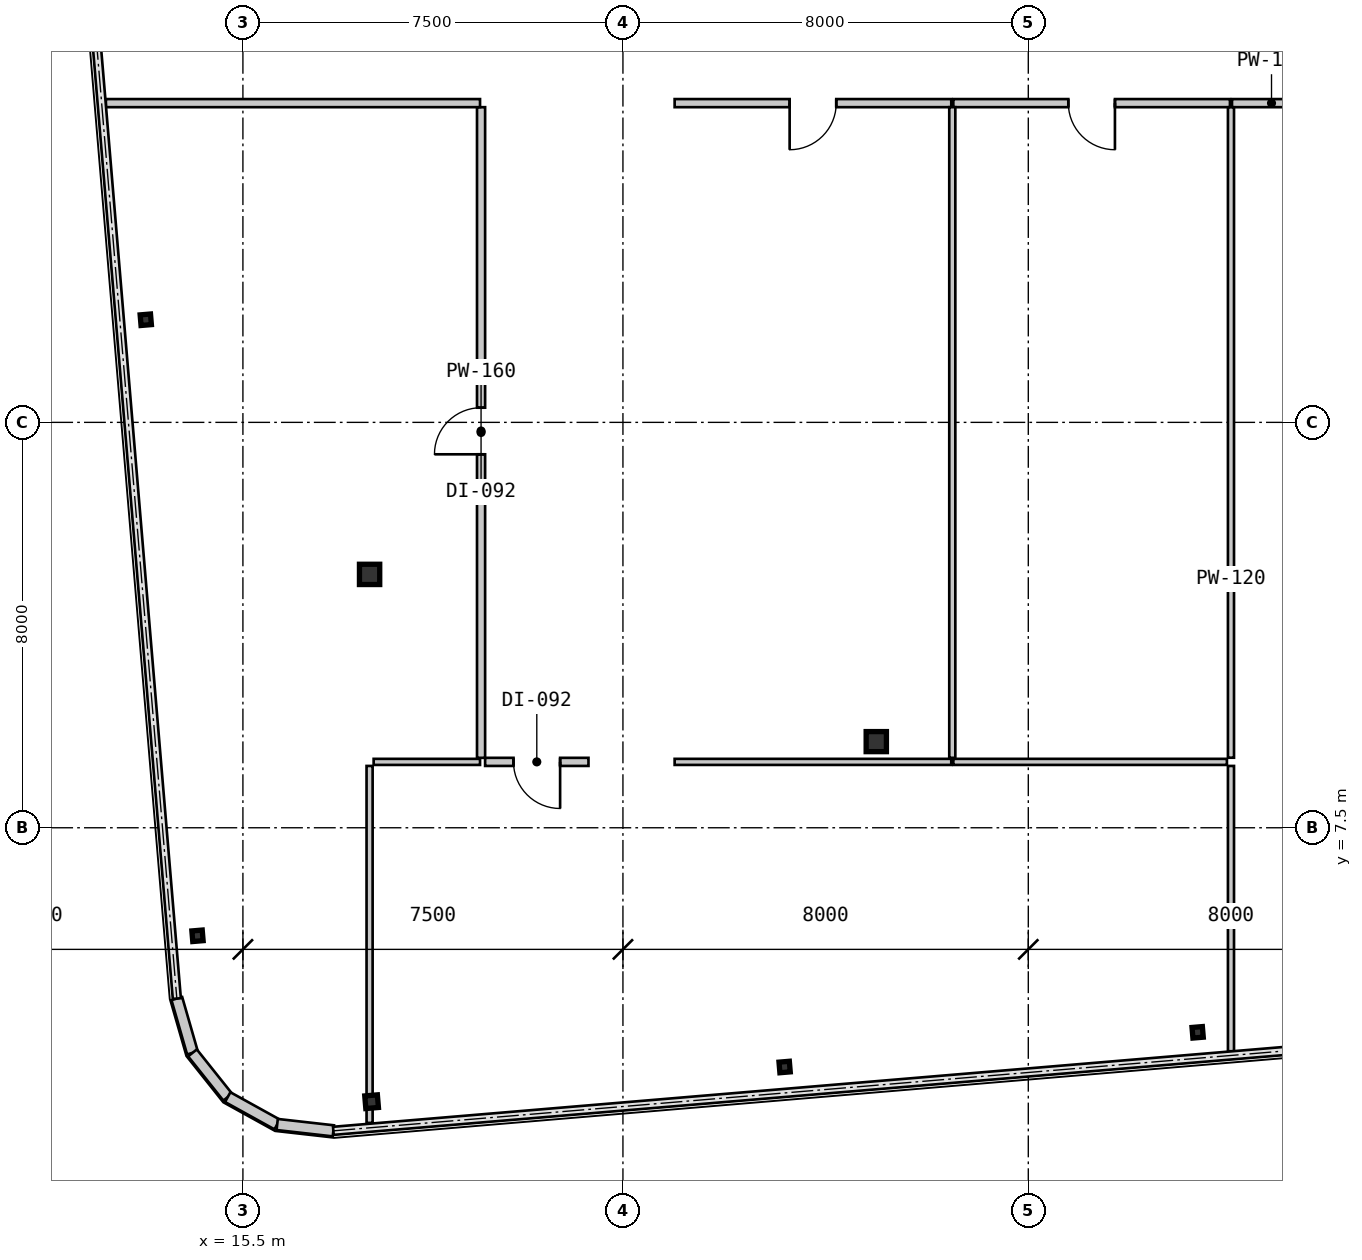
"""IFC4 building model, lengths in metres.
Left out: names, types, materials, properties, quantities, classifications, styles, units other than length and angle.
Written with IfcOpenShell. Run it as: python <this file> out.ifc"""

import sys

from ifc_helpers import new_model, si_unit, direction, frame, frame_2d, origin, origin_2d, place, context, subcontext, project, spatial, rectangle, hollow_rectangle, i_section, extrude, source, transform, mapped, element, fill, save


model = new_model("IFC4")
c1 = context("Model", 3, precision=1e-05, world=origin(), true_north=direction((0.0, 1.0)))
c2 = subcontext(c1, "Body", "Model", "MODEL_VIEW")
j1 = project(units=[si_unit("LENGTHUNIT", "METRE"), si_unit("PLANEANGLEUNIT", "RADIAN")], contexts=[c1])
p1 = place(None, origin())
s1 = spatial("IfcSite", under=j1, at=p1, CompositionType="ELEMENT")
p2 = place(p1, origin())
s2 = spatial("IfcBuilding", under=s1, at=p2, CompositionType="ELEMENT")
p3 = place(p2, frame((0.0, 0.0, 185.15)))
s3 = spatial("IfcBuildingStorey", under=s2, at=p3, CompositionType="ELEMENT", Elevation=185.15)
m1 = source(origin(), c2, "Body", "SweptSolid", [
    extrude(i_section(OverallWidth=0.4, OverallDepth=0.396, WebThickness=0.022, FlangeThickness=0.034, at=origin_2d()), origin(), (0.0, 0.0, 1.0), 3.15),
])
p4 = place(p3, frame((28.0, 9.2, 0.0), z_axis=(0.0, 0.0, 1.0), x_axis=(1.0, 0.0, 0.0)))
e1 = element("IfcColumn", 1, at=p4, inside=s3, PredefinedType="COLUMN", context=c2, shape_type="MappedRepresentation", body=[
    mapped(m1, transform((0.0, 0.0, 0.0), scale=1.0)),
])
m2 = source(origin(), c2, "Body", "SweptSolid", [
    extrude(hollow_rectangle(XDim=0.4, YDim=0.4, WallThickness=0.016, at=origin_2d()), origin(), (0.0, 0.0, 1.0), 3.15),
])
p5 = place(p3, frame((18.0, 12.5, 0.0), z_axis=(0.0, 0.0, 1.0), x_axis=(1.0, 0.0, 0.0)))
e2 = element("IfcColumn", 2, at=p5, inside=s3, PredefinedType="COLUMN", context=c2, shape_type="MappedRepresentation", body=[
    mapped(m2, transform((0.0, 0.0, 0.0), scale=1.0)),
])
m3 = source(origin(), c2, "Body", "SweptSolid", [
    extrude(hollow_rectangle(XDim=0.25, YDim=0.25, WallThickness=0.01, at=origin_2d()), origin(), (0.0, 0.0, 1.0), 3.15),
])
p6 = place(p3, frame((18.04, 2.094, 0.0), z_axis=(0.0, 0.0, 1.0), x_axis=(0.99649285925, 0.083677843332, 0.0)))
e3 = element("IfcColumn", 3, at=p6, inside=s3, PredefinedType="COLUMN", context=c2, shape_type="MappedRepresentation", body=[
    mapped(m3, transform((0.0, 0.0, 0.0), scale=1.0)),
])
m4 = source(origin(), c2, "Body", "SweptSolid", [
    extrude(i_section(OverallWidth=0.205, OverallDepth=0.21, WebThickness=0.009, FlangeThickness=0.014, at=origin_2d()), origin(), (0.0, 0.0, 1.0), 3.15),
])
for number, where, z_axis, x_axis in (
    (4, (26.191, 2.779, 0.0), (0.0, 0.0, 1.0), (0.996, 0.084, 0.0)),
    (5, (34.342, 3.463, 0.0), (0.0, 0.0, 1.0), (0.996, 0.084, 0.0)),
    (6, (14.604, 5.368, 0.0), (0.0, 0.0, 1.0), (0.996, 0.084, 0.0)),
    (7, (13.583, 17.525, 0.0), (0.0, 0.0, 1.0), (0.996, 0.084, 0.0)),
):
    element("IfcColumn", number, at=place(p3, frame(where, z_axis=z_axis, x_axis=x_axis)), inside=s3, PredefinedType="COLUMN", context=c2, shape_type="MappedRepresentation", body=[
        mapped(m4, transform((0.0, 0.0, 0.0), scale=1.0)),
    ])
m5 = source(origin(), c2, "Body", "SweptSolid", [
    extrude(rectangle(XDim=1.116, YDim=0.22, at=frame_2d((0.558, 0.0))), origin(), (0.0, 0.0, 1.0), 2.93),
])
for number, where, z_axis, x_axis in (
    (8, (14.196, 4.13, 0.0), (0.0, 0.0, 1.0), (0.277, -0.961, 0.0)),
    (9, (14.504, 3.057, 0.0), (0.0, 0.0, 1.0), (0.623, -0.782, 0.0)),
    (10, (15.2, 2.184, 0.0), (0.0, 0.0, 1.0), (0.875, -0.484, 0.0)),
    (11, (16.176, 1.644, 0.0), (0.0, 0.0, 1.0), (0.994, -0.112, 0.0)),
):
    element("IfcWall", number, at=place(p3, frame(where, z_axis=z_axis, x_axis=x_axis)), inside=s3, PredefinedType="SOLIDWALL", context=c2, shape_type="MappedRepresentation", body=[
        mapped(m5, transform((0.0, 0.0, 0.0), scale=1.0)),
    ])
m6 = source(origin(), c2, "Body", "SweptSolid", [
    extrude(rectangle(XDim=2.04, YDim=0.16, at=frame_2d((1.02, 0.0))), origin(), (0.0, 0.0, 1.0), 2.93),
])
p7 = place(p3, frame((22.32, 8.8, 0.0), z_axis=(0.0, 0.0, 1.0), x_axis=(-1.0, 0.0, 0.0)))
e12 = element("IfcWall", 12, at=p7, inside=s3, PredefinedType="PARTITIONING", context=c2, shape_type="MappedRepresentation", body=[
    mapped(m6, transform((0.0, 0.0, 0.0), scale=1.0)),
])
m7 = source(origin(), c2, "Body", "SweptSolid", [
    extrude(rectangle(XDim=0.92, YDim=2.1, at=frame_2d((0.46, 1.05))), frame((0.0, 0.09, 0.0), z_axis=(0.0, -1.0, 0.0), x_axis=(1.0, 0.0, 0.0)), (0.0, 0.0, 1.0), 0.18),
])
p8 = place(p7, frame((0.56, 0.0, 0.0)))
e13 = element("IfcOpeningElement", 13, at=p8, cuts=e12, PredefinedType="OPENING", context=c2, shape_type="MappedRepresentation", body=[
    mapped(m7, transform((0.0, 0.0, 0.0), scale=1.0)),
])
m8 = source(origin(), c2, "Body", "SweptSolid", [
    extrude(rectangle(XDim=12.84, YDim=0.16, at=frame_2d((6.42, 0.0))), origin(), (0.0, 0.0, 1.0), 2.93),
])
p9 = place(p3, frame((20.2, 8.88, 0.0), z_axis=(0.0, 0.0, 1.0), x_axis=(0.0, 1.0, 0.0)))
e14 = element("IfcWall", 14, at=p9, inside=s3, PredefinedType="PARTITIONING", context=c2, shape_type="MappedRepresentation", body=[
    mapped(m8, transform((0.0, 0.0, 0.0), scale=1.0)),
])
p10 = place(p9, frame((5.99, 0.0, 0.0)))
e15 = element("IfcOpeningElement", 15, at=p10, cuts=e14, PredefinedType="OPENING", context=c2, shape_type="MappedRepresentation", body=[
    mapped(m7, transform((0.0, 0.0, 0.0), scale=1.0)),
])
m9 = source(origin(), c2, "Body", "SweptSolid", [
    extrude(rectangle(XDim=7.384, YDim=0.16, at=frame_2d((3.692, 0.0))), origin(), (0.0, 0.0, 1.0), 2.93),
])
p11 = place(p3, frame((20.18, 21.8, 0.0), z_axis=(0.0, 0.0, 1.0), x_axis=(-1.0, 0.0, 0.0)))
e16 = element("IfcWall", 16, at=p11, inside=s3, PredefinedType="PARTITIONING", context=c2, shape_type="MappedRepresentation", body=[
    mapped(m9, transform((0.0, 0.0, 0.0), scale=1.0)),
])
m10 = source(origin(), c2, "Body", "SweptSolid", [
    extrude(rectangle(XDim=5.459, YDim=0.16, at=frame_2d((2.73, 0.0))), origin(), (0.0, 0.0, 1.0), 2.93),
])
p12 = place(p3, frame((29.48, 21.8, 0.0), z_axis=(0.0, 0.0, 1.0), x_axis=(-1.0, 0.0, 0.0)))
e17 = element("IfcWall", 17, at=p12, inside=s3, PredefinedType="PARTITIONING", context=c2, shape_type="MappedRepresentation", body=[
    mapped(m10, transform((0.0, 0.0, 0.0), scale=1.0)),
])
p13 = place(p12, frame((2.27, 0.0, 0.0)))
e18 = element("IfcOpeningElement", 18, at=p13, cuts=e17, PredefinedType="OPENING", context=c2, shape_type="MappedRepresentation", body=[
    mapped(m7, transform((0.0, 0.0, 0.0), scale=1.0)),
])
p14 = place(p3, frame((34.98, 21.8, 0.0), z_axis=(0.0, 0.0, 1.0), x_axis=(-1.0, 0.0, 0.0)))
e19 = element("IfcWall", 19, at=p14, inside=s3, PredefinedType="PARTITIONING", context=c2, shape_type="MappedRepresentation", body=[
    mapped(m10, transform((0.0, 0.0, 0.0), scale=1.0)),
])
p15 = place(p14, frame((2.27, 0.0, 0.0)))
e20 = element("IfcOpeningElement", 20, at=p15, cuts=e19, PredefinedType="OPENING", context=c2, shape_type="MappedRepresentation", body=[
    mapped(m7, transform((0.0, 0.0, 0.0), scale=1.0)),
])
m11 = source(origin(), c2, "Body", "SweptSolid", [
    extrude(rectangle(XDim=7.459, YDim=0.16, at=frame_2d((3.73, 0.0))), origin(), (0.0, 0.0, 1.0), 2.93),
])
p16 = place(p3, frame((42.48, 21.8, 0.0), z_axis=(0.0, 0.0, 1.0), x_axis=(-1.0, 0.0, 0.0)))
e21 = element("IfcWall", 21, at=p16, inside=s3, PredefinedType="PARTITIONING", context=c2, shape_type="MappedRepresentation", body=[
    mapped(m11, transform((0.0, 0.0, 0.0), scale=1.0)),
])
p17 = place(p16, frame((3.27, 0.0, 0.0)))
e22 = element("IfcOpeningElement", 22, at=p17, cuts=e21, PredefinedType="OPENING", context=c2, shape_type="MappedRepresentation", body=[
    mapped(m7, transform((0.0, 0.0, 0.0), scale=1.0)),
])
m12 = source(origin(), c2, "Body", "SweptSolid", [
    extrude(rectangle(XDim=0.418, YDim=0.12, at=frame_2d((0.209, 0.0))), origin(), (0.0, 0.0, 1.0), 2.93),
])
p18 = place(p3, frame((18.0, 1.676, 0.0), z_axis=(0.0, 0.0, 1.0), x_axis=(0.0, 1.0, 0.0)))
e23 = element("IfcWall", 23, at=p18, inside=s3, PredefinedType="PARTITIONING", context=c2, shape_type="MappedRepresentation", body=[
    mapped(m12, transform((0.0, 0.0, 0.0), scale=1.0)),
])
m13 = source(origin(), c2, "Body", "SweptSolid", [
    extrude(rectangle(XDim=6.626, YDim=0.12, at=frame_2d((3.313, 0.0))), origin(), (0.0, 0.0, 1.0), 2.47),
])
p19 = place(p3, frame((18.0, 2.094, 0.0), z_axis=(0.0, 0.0, 1.0), x_axis=(0.0, 1.0, 0.0)))
e24 = element("IfcWall", 24, at=p19, inside=s3, PredefinedType="PARTITIONING", context=c2, shape_type="MappedRepresentation", body=[
    mapped(m13, transform((0.0, 0.0, 0.0), scale=1.0)),
])
m14 = source(origin(), c2, "Body", "SweptSolid", [
    extrude(rectangle(XDim=2.1, YDim=0.12, at=frame_2d((1.05, 0.0))), origin(), (0.0, 0.0, 1.0), 2.93),
])
p20 = place(p3, frame((18.08, 8.8, 0.0), z_axis=(0.0, 0.0, 1.0), x_axis=(1.0, 0.0, 0.0)))
e25 = element("IfcWall", 25, at=p20, inside=s3, PredefinedType="PARTITIONING", context=c2, shape_type="MappedRepresentation", body=[
    mapped(m14, transform((0.0, 0.0, 0.0), scale=1.0)),
])
m15 = source(origin(), c2, "Body", "SweptSolid", [
    extrude(rectangle(XDim=5.459, YDim=0.12, at=frame_2d((2.73, 0.0))), origin(), (0.0, 0.0, 1.0), 2.93),
])
p21 = place(p3, frame((24.02, 8.8, 0.0), z_axis=(0.0, 0.0, 1.0), x_axis=(1.0, 0.0, 0.0)))
e26 = element("IfcWall", 26, at=p21, inside=s3, PredefinedType="PARTITIONING", context=c2, shape_type="MappedRepresentation", body=[
    mapped(m15, transform((0.0, 0.0, 0.0), scale=1.0)),
])
m16 = source(origin(), c2, "Body", "SweptSolid", [
    extrude(rectangle(XDim=5.4, YDim=0.12, at=frame_2d((2.7, 0.0))), origin(), (0.0, 0.0, 1.0), 2.93),
])
p22 = place(p3, frame((29.52, 8.8, 0.0), z_axis=(0.0, 0.0, 1.0), x_axis=(1.0, 0.0, 0.0)))
e27 = element("IfcWall", 27, at=p22, inside=s3, PredefinedType="PARTITIONING", context=c2, shape_type="MappedRepresentation", body=[
    mapped(m16, transform((0.0, 0.0, 0.0), scale=1.0)),
])
m17 = source(origin(), c2, "Body", "SweptSolid", [
    extrude(rectangle(XDim=5.63, YDim=0.12, at=frame_2d((2.815, 0.0))), origin(), (0.0, 0.0, 1.0), 2.93),
])
p23 = place(p3, frame((35.0, 8.72, 0.0), z_axis=(0.0, 0.0, 1.0), x_axis=(0.0, -1.0, 0.0)))
e28 = element("IfcWall", 28, at=p23, inside=s3, PredefinedType="PARTITIONING", context=c2, shape_type="MappedRepresentation", body=[
    mapped(m17, transform((0.0, 0.0, 0.0), scale=1.0)),
])
m18 = source(origin(), c2, "Body", "SweptSolid", [
    extrude(rectangle(XDim=12.84, YDim=0.12, at=frame_2d((6.42, 0.0))), origin(), (0.0, 0.0, 1.0), 2.93),
])
p24 = place(p3, frame((29.5, 21.72, 0.0), z_axis=(0.0, 0.0, 1.0), x_axis=(0.0, -1.0, 0.0)))
e29 = element("IfcWall", 29, at=p24, inside=s3, PredefinedType="PARTITIONING", context=c2, shape_type="MappedRepresentation", body=[
    mapped(m18, transform((0.0, 0.0, 0.0), scale=1.0)),
])
m19 = source(origin(), c2, "Body", "SweptSolid", [
    extrude(rectangle(XDim=12.836, YDim=0.12, at=frame_2d((6.418, 0.0))), origin(), (0.0, 0.0, 1.0), 2.93),
])
p25 = place(p3, frame((35.0, 21.718, 0.0), z_axis=(0.0, 0.0, 1.0), x_axis=(0.0, -1.0, 0.0)))
e30 = element("IfcWall", 30, at=p25, inside=s3, PredefinedType="PARTITIONING", context=c2, shape_type="MappedRepresentation", body=[
    mapped(m19, transform((0.0, 0.0, 0.0), scale=1.0)),
])
m20 = source(origin(), c2, "Body", "SweptSolid", [
    extrude(rectangle(XDim=0.92, YDim=2.1, at=frame_2d((0.46, 1.05))), frame((0.0, 0.025, 0.0), z_axis=(0.0, -1.0, 0.0), x_axis=(1.0, 0.0, 0.0)), (0.0, 0.0, 1.0), 0.05),
])
p26 = place(p8, origin())
e31 = element("IfcDoor", 31, at=p26, inside=s3, OperationType="SINGLE_SWING_LEFT", PredefinedType="DOOR", context=c2, shape_type="MappedRepresentation", body=[
    mapped(m20, transform((0.0, 0.0, 0.0), scale=1.0)),
])
fill(e13, e31)
p27 = place(p10, origin())
e32 = element("IfcDoor", 32, at=p27, inside=s3, OperationType="SINGLE_SWING_LEFT", PredefinedType="DOOR", context=c2, shape_type="MappedRepresentation", body=[
    mapped(m20, transform((0.0, 0.0, 0.0), scale=1.0)),
])
fill(e15, e32)
p28 = place(p13, origin())
e33 = element("IfcDoor", 33, at=p28, inside=s3, OperationType="SINGLE_SWING_RIGHT", PredefinedType="DOOR", context=c2, shape_type="MappedRepresentation", body=[
    mapped(m20, transform((0.0, 0.0, 0.0), scale=1.0)),
])
fill(e18, e33)
p29 = place(p15, origin())
e34 = element("IfcDoor", 34, at=p29, inside=s3, OperationType="SINGLE_SWING_LEFT", PredefinedType="DOOR", context=c2, shape_type="MappedRepresentation", body=[
    mapped(m20, transform((0.0, 0.0, 0.0), scale=1.0)),
])
fill(e20, e34)
save(model, sys.argv[1])
